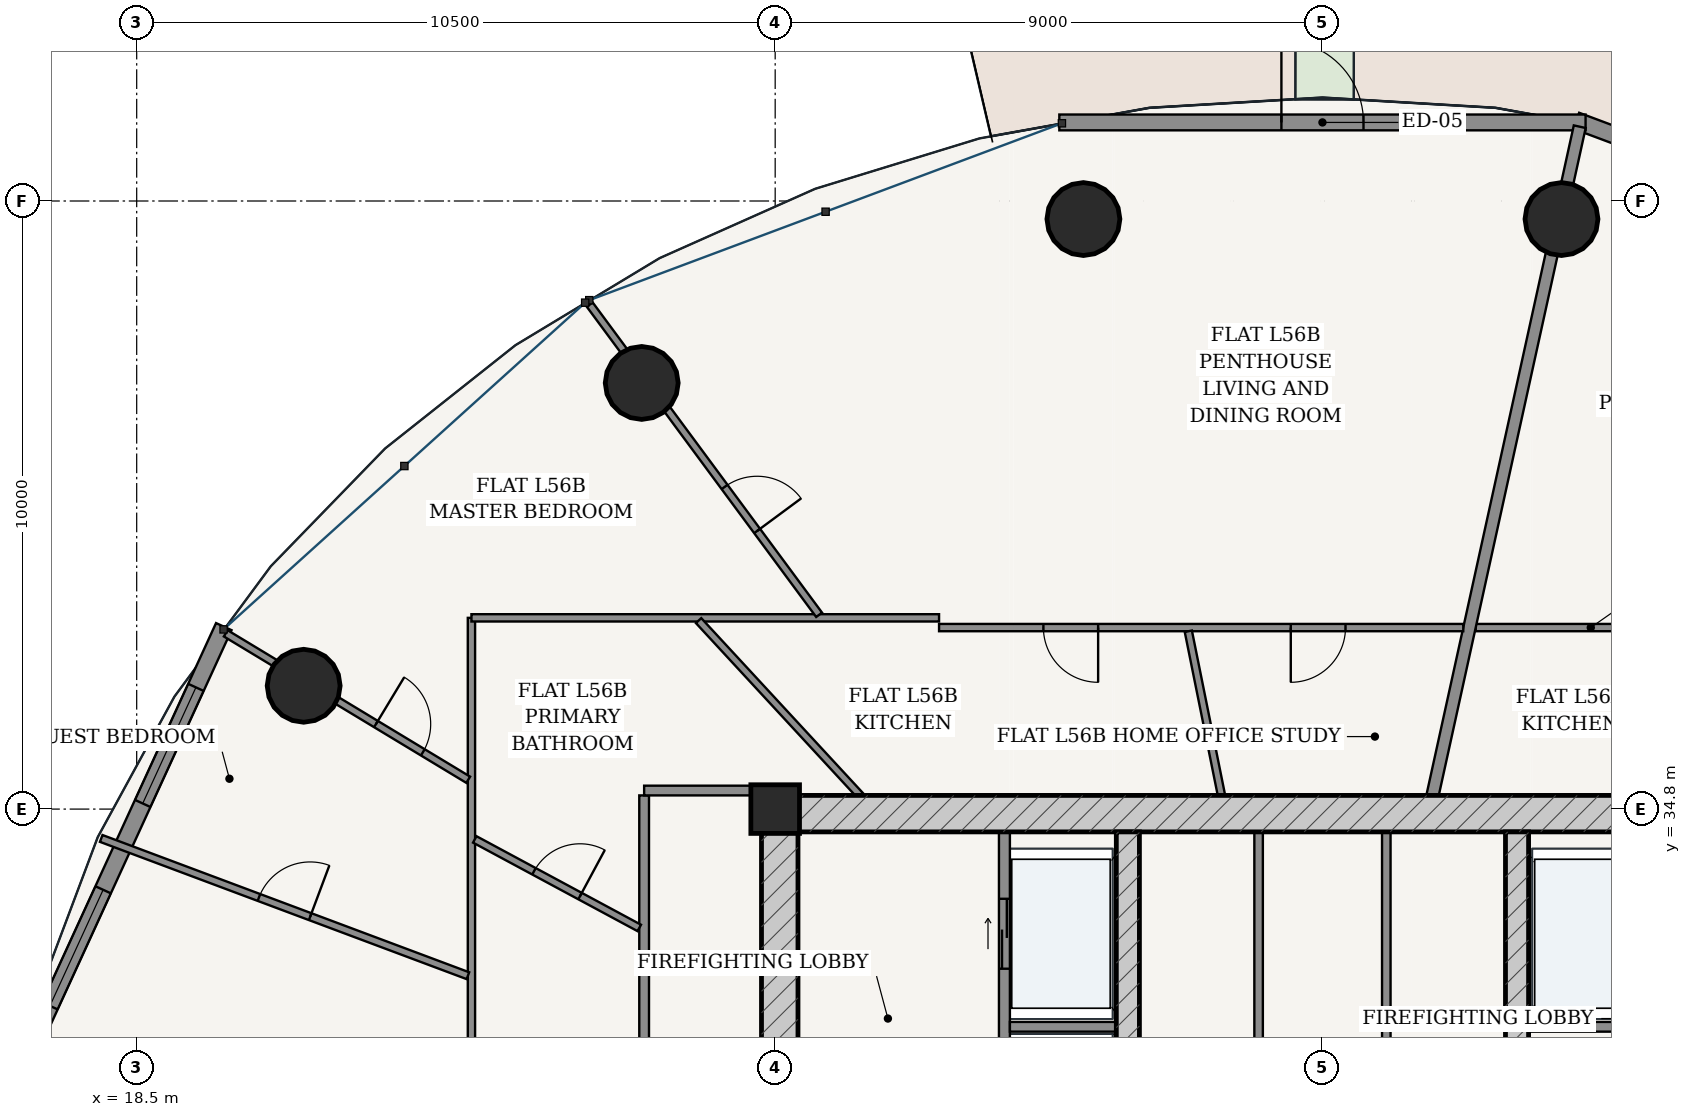
"""IFC4 building model, lengths in metres.
Left out: names, types, materials, properties, quantities, classifications, styles, units other than length and angle.
Written with IfcOpenShell. Run it as: python <this file> out.ifc"""

import sys

from ifc_helpers import new_model, si_unit, direction, frame, frame_2d, origin, origin_2d, place, context, subcontext, project, spatial, rectangle, hollow_circle, extrude, source, transform, mapped, element, fill, save


model = new_model("IFC4")
c1 = context("Model", 3, precision=1e-05, world=origin(), true_north=direction((-0.2419218956, 0.970295726276)))
c2 = subcontext(c1, "Body", "Model", "MODEL_VIEW")
j1 = project(units=[si_unit("LENGTHUNIT", "METRE"), si_unit("PLANEANGLEUNIT", "RADIAN")], contexts=[c1])
p1 = place(None, origin())
s1 = spatial("IfcSite", under=j1, at=p1, CompositionType="ELEMENT")
p2 = place(p1, origin())
s2 = spatial("IfcBuilding", under=s1, at=p2, CompositionType="ELEMENT")
p3 = place(p2, frame((0.0, 0.0, 213.4)))
s3 = spatial("IfcBuildingStorey", under=s2, at=p3, CompositionType="ELEMENT", Elevation=213.4)
p4 = place(p3, frame((29.0, 34.8, 0.0), z_axis=(0.0, 0.0, 1.0), x_axis=(1.0, 0.0, 0.0)))
e1 = element("IfcColumn", 1, at=p4, inside=s3, PredefinedType="COLUMN", context=c2, shape_type="SweptSolid", body=[
    extrude(rectangle(XDim=0.8, YDim=0.8, at=origin_2d()), origin(), (0.0, 0.0, 1.0), 3.7),
])
p5 = place(p3, frame((28.775, 34.725, 0.0), z_axis=(0.0, 0.0, 1.0), x_axis=(1.0, 0.0, 0.0)))
e2 = element("IfcWall", 2, at=p5, inside=s3, PredefinedType="SHEAR", context=c2, shape_type="SweptSolid", body=[
    extrude(rectangle(XDim=18.45, YDim=0.6, at=frame_2d((9.225, 0.0))), origin(), (0.0, 0.0, 1.0), 3.435),
])
p6 = place(p3, frame((29.075, 19.175, 0.0), z_axis=(0.0, 0.0, 1.0), x_axis=(0.0, 1.0, 0.0)))
e3 = element("IfcWall", 3, at=p6, inside=s3, PredefinedType="SHEAR", context=c2, shape_type="SweptSolid", body=[
    extrude(rectangle(XDim=15.25, YDim=0.6, at=frame_2d((7.625, 0.0))), origin(), (0.0, 0.0, 1.0), 3.435),
])
p7 = place(p6, frame((9.875, 0.0, 0.0)))
e4 = element("IfcOpeningElement", 4, at=p7, cuts=e3, PredefinedType="OPENING", context=c2, shape_type="SweptSolid", body=[
    extrude(rectangle(XDim=1.5, YDim=2.2, at=frame_2d((0.75, 1.1))), frame((0.0, 0.31, 0.0), z_axis=(0.0, -1.0, 0.0), x_axis=(1.0, 0.0, 0.0)), (0.0, 0.0, 1.0), 0.62),
])
p8 = place(p3, frame((34.8, 19.175, 0.0), z_axis=(0.0, 0.0, 1.0), x_axis=(0.0, 1.0, 0.0)))
e5 = element("IfcWall", 5, at=p8, inside=s3, PredefinedType="SHEAR", context=c2, shape_type="SweptSolid", body=[
    extrude(rectangle(XDim=15.25, YDim=0.38, at=frame_2d((7.625, 0.0))), origin(), (0.0, 0.0, 1.0), 3.435),
])
p9 = place(p8, frame((7.8, 0.0, 0.0)))
e6 = element("IfcOpeningElement", 6, at=p9, cuts=e5, PredefinedType="OPENING", context=c2, shape_type="SweptSolid", body=[
    extrude(rectangle(XDim=1.05, YDim=2.15, at=frame_2d((0.525, 1.075))), frame((0.0, 0.2, 0.0), z_axis=(0.0, -1.0, 0.0), x_axis=(1.0, 0.0, 0.0)), (0.0, 0.0, 1.0), 0.4),
])
p10 = place(p3, frame((41.2, 19.175, 0.0), z_axis=(0.0, 0.0, 1.0), x_axis=(0.0, 1.0, 0.0)))
e7 = element("IfcWall", 7, at=p10, inside=s3, PredefinedType="SHEAR", context=c2, shape_type="SweptSolid", body=[
    extrude(rectangle(XDim=15.25, YDim=0.38, at=frame_2d((7.625, 0.0))), origin(), (0.0, 0.0, 1.0), 3.435),
])
p11 = place(p10, frame((7.8, 0.0, 0.0)))
e8 = element("IfcOpeningElement", 8, at=p11, cuts=e7, PredefinedType="OPENING", context=c2, shape_type="SweptSolid", body=[
    extrude(rectangle(XDim=1.05, YDim=2.15, at=frame_2d((0.525, 1.075))), frame((0.0, 0.2, 0.0), z_axis=(0.0, -1.0, 0.0), x_axis=(1.0, 0.0, 0.0)), (0.0, 0.0, 1.0), 0.4),
])
for number, where, z_axis, x_axis in (
    (9, (41.931, 44.503, 0.0), (0.0, 0.0, 1.0), (1.0, 0.0, 0.0)),
    (10, (34.069, 44.503, 0.0), (0.0, 0.0, 1.0), (1.0, 0.0, 0.0)),
    (11, (26.805, 41.808, 0.0), (0.0, 0.0, 1.0), (1.0, 0.0, 0.0)),
    (12, (21.246, 36.828, 0.0), (0.0, 0.0, 1.0), (1.0, 0.0, 0.0)),
):
    element("IfcColumn", number, at=place(p3, frame(where, z_axis=z_axis, x_axis=x_axis)), inside=s3, PredefinedType="COLUMN", context=c2, shape_type="SweptSolid", body=[
        extrude(hollow_circle(Radius=0.6, WallThickness=0.038, at=origin_2d()), origin(), (0.0, 0.0, 1.0), 3.7),
    ])
p12 = place(p3, frame((50.17, 43.127, 0.0), z_axis=(0.0, 0.0, 1.0), x_axis=(-0.936556918375, 0.350515532672, 0.0)))
e13 = element("IfcWall", 13, at=p12, inside=s3, PredefinedType="SOLIDWALL", context=c2, shape_type="SweptSolid", body=[
    extrude(rectangle(XDim=8.539, YDim=0.28, at=frame_2d((4.27, 0.0))), origin(), (0.0, 0.0, 1.0), 3.435),
])
p13 = place(p12, frame((1.256, 0.0, 0.85)))
e14 = element("IfcOpeningElement", 14, at=p13, cuts=e13, PredefinedType="OPENING", context=c2, shape_type="SweptSolid", body=[
    extrude(rectangle(XDim=2.1, YDim=1.95, at=frame_2d((1.05, 0.975))), frame((0.0, 0.15, 0.0), z_axis=(0.0, -1.0, 0.0), x_axis=(1.0, 0.0, 0.0)), (0.0, 0.0, 1.0), 0.3),
])
p14 = place(p12, frame((5.184, 0.0, 0.85)))
e15 = element("IfcOpeningElement", 15, at=p14, cuts=e13, PredefinedType="OPENING", context=c2, shape_type="SweptSolid", body=[
    extrude(rectangle(XDim=2.1, YDim=1.95, at=frame_2d((1.05, 0.975))), frame((0.0, 0.15, 0.0), z_axis=(0.0, -1.0, 0.0), x_axis=(1.0, 0.0, 0.0)), (0.0, 0.0, 1.0), 0.3),
])
p15 = place(p3, frame((42.327, 46.092, 0.0), z_axis=(0.0, 0.0, 1.0), x_axis=(-1.0, 0.0, 0.0)))
e16 = element("IfcWall", 16, at=p15, inside=s3, PredefinedType="SOLIDWALL", context=c2, shape_type="SweptSolid", body=[
    extrude(rectangle(XDim=8.654, YDim=0.26, at=frame_2d((4.327, 0.0))), origin(), (0.0, 0.0, 1.0), 3.435),
])
p16 = place(p15, frame((3.652, 0.0, 0.0)))
e17 = element("IfcOpeningElement", 17, at=p16, cuts=e16, PredefinedType="OPENING", context=c2, shape_type="SweptSolid", body=[
    extrude(rectangle(XDim=1.35, YDim=2.2, at=frame_2d((0.675, 1.1))), frame((0.0, 0.14, 0.0), z_axis=(0.0, -1.0, 0.0), x_axis=(1.0, 0.0, 0.0)), (0.0, 0.0, 1.0), 0.28),
])
p17 = place(p3, frame((19.932, 37.801, 0.0), z_axis=(0.0, 0.0, 1.0), x_axis=(-0.416717018135, -0.909036262641, 0.0)))
e18 = element("IfcWall", 18, at=p17, inside=s3, PredefinedType="SOLIDWALL", context=c2, shape_type="SweptSolid", body=[
    extrude(rectangle(XDim=7.96, YDim=0.28, at=frame_2d((3.98, 0.0))), origin(), (0.0, 0.0, 1.0), 3.435),
])
p18 = place(p17, frame((1.099, 0.0, 0.85)))
e19 = element("IfcOpeningElement", 19, at=p18, cuts=e18, PredefinedType="OPENING", context=c2, shape_type="SweptSolid", body=[
    extrude(rectangle(XDim=2.1, YDim=1.95, at=frame_2d((1.05, 0.975))), frame((0.0, 0.15, 0.0), z_axis=(0.0, -1.0, 0.0), x_axis=(1.0, 0.0, 0.0)), (0.0, 0.0, 1.0), 0.3),
])
p19 = place(p17, frame((4.761, 0.0, 0.85)))
e20 = element("IfcOpeningElement", 20, at=p19, cuts=e18, PredefinedType="OPENING", context=c2, shape_type="SweptSolid", body=[
    extrude(rectangle(XDim=2.1, YDim=1.95, at=frame_2d((1.05, 0.975))), frame((0.0, 0.15, 0.0), z_axis=(0.0, -1.0, 0.0), x_axis=(1.0, 0.0, 0.0)), (0.0, 0.0, 1.0), 0.3),
])
p20 = place(p3, frame((32.77, 28.52, 0.0), z_axis=(0.0, 0.0, 1.0), x_axis=(0.0, 1.0, 0.0)))
e21 = element("IfcWall", 21, at=p20, inside=s3, PredefinedType="PARTITIONING", context=c2, shape_type="SweptSolid", body=[
    extrude(rectangle(XDim=5.905, YDim=0.18, at=frame_2d((2.953, 0.0))), origin(), (0.0, 0.0, 1.0), 3.435),
])
p21 = place(p20, frame((3.655, 0.0, 0.0)))
e22 = element("IfcOpeningElement", 22, at=p21, cuts=e21, PredefinedType="OPENING", context=c2, shape_type="SweptSolid", body=[
    extrude(rectangle(XDim=1.15, YDim=2.2, at=frame_2d((0.575, 1.1))), frame((0.0, 0.1, 0.0), z_axis=(0.0, -1.0, 0.0), x_axis=(1.0, 0.0, 0.0)), (0.0, 0.0, 1.0), 0.2),
])
p22 = place(p20, frame((0.73, 0.0, 0.0)))
e23 = element("IfcOpeningElement", 23, at=p22, cuts=e21, PredefinedType="OPENING", context=c2, shape_type="SweptSolid", body=[
    extrude(rectangle(XDim=1.2, YDim=2.25, at=frame_2d((0.6, 1.125))), frame((0.0, 0.1, 0.0), z_axis=(0.0, -1.0, 0.0), x_axis=(1.0, 0.0, 0.0)), (0.0, 0.0, 1.0), 0.2),
])
for number, where, z_axis, x_axis in (
    (24, (32.86, 31.22, 0.0), (0.0, 0.0, 1.0), (1.0, 0.0, 0.0)),
    (25, (41.39, 31.22, 0.0), (0.0, 0.0, 1.0), (1.0, 0.0, 0.0)),
):
    element("IfcWall", number, at=place(p3, frame(where, z_axis=z_axis, x_axis=x_axis)), inside=s3, PredefinedType="PARTITIONING", context=c2, shape_type="SweptSolid", body=[
        extrude(rectangle(XDim=1.75, YDim=0.16, at=frame_2d((0.875, 0.0))), origin(), (0.0, 0.0, 1.0), 3.435),
    ])
for number, where, z_axis, x_axis in (
    (26, (36.95, 28.56, 0.0), (0.0, 0.0, 1.0), (0.0, 1.0, 0.0)),
    (27, (39.05, 28.56, 0.0), (0.0, 0.0, 1.0), (0.0, 1.0, 0.0)),
):
    element("IfcWall", number, at=place(p3, frame(where, z_axis=z_axis, x_axis=x_axis)), inside=s3, PredefinedType="PARTITIONING", context=c2, shape_type="SweptSolid", body=[
        extrude(rectangle(XDim=5.865, YDim=0.14, at=frame_2d((2.933, 0.0))), origin(), (0.0, 0.0, 1.0), 3.435),
    ])
p23 = place(p3, frame((26.845, 24.4, 0.0), z_axis=(0.0, 0.0, 1.0), x_axis=(0.0, 1.0, 0.0)))
e28 = element("IfcWall", 28, at=p23, inside=s3, PredefinedType="PARTITIONING", context=c2, shape_type="SweptSolid", body=[
    extrude(rectangle(XDim=10.625, YDim=0.16, at=frame_2d((5.312, 0.0))), origin(), (0.0, 0.0, 1.0), 2.951),
])
p24 = place(p23, frame((4.936, 0.0, 0.0)))
e29 = element("IfcOpeningElement", 29, at=p24, cuts=e28, PredefinedType="OPENING", context=c2, shape_type="SweptSolid", body=[
    extrude(rectangle(XDim=0.98, YDim=2.2, at=frame_2d((0.49, 1.1))), frame((0.0, 0.09, 0.0), z_axis=(0.0, -1.0, 0.0), x_axis=(1.0, 0.0, 0.0)), (0.0, 0.0, 1.0), 0.18),
])
p25 = place(p3, frame((26.845, 35.105, 0.0), z_axis=(0.0, 0.0, 1.0), x_axis=(1.0, 0.0, 0.0)))
e30 = element("IfcWall", 30, at=p25, inside=s3, PredefinedType="PARTITIONING", context=c2, shape_type="SweptSolid", body=[
    extrude(rectangle(XDim=1.93, YDim=0.16, at=frame_2d((0.965, 0.0))), origin(), (0.0, 0.0, 1.0), 3.435),
])
p26 = place(p3, frame((40.52, 37.785, 0.0), z_axis=(0.0, 0.0, 1.0), x_axis=(1.0, 0.0, 0.0)))
e31 = element("IfcWall", 31, at=p26, inside=s3, PredefinedType="PARTITIONING", context=c2, shape_type="SweptSolid", body=[
    extrude(rectangle(XDim=3.785, YDim=0.12, at=frame_2d((1.893, 0.0))), origin(), (0.0, 0.0, 1.0), 2.951),
])
p27 = place(p3, frame((39.811, 35.027, 0.0), z_axis=(0.0, 0.0, 1.0), x_axis=(0.214966857327, 0.976621344356, 0.0)))
e32 = element("IfcWall", 32, at=p27, inside=s3, PredefinedType="PARTITIONING", context=c2, shape_type="SweptSolid", body=[
    extrude(rectangle(XDim=11.258, YDim=0.2, at=frame_2d((5.629, 0.0))), origin(), (0.0, 0.0, 1.0), 2.52),
])
p28 = place(p3, frame((24.005, 26.902, 0.0), z_axis=(0.0, 0.0, 1.0), x_axis=(0.0, 1.0, 0.0)))
e33 = element("IfcWall", 33, at=p28, inside=s3, PredefinedType="PARTITIONING", context=c2, shape_type="SweptSolid", body=[
    extrude(rectangle(XDim=11.043, YDim=0.12, at=frame_2d((5.521, 0.0))), origin(), (0.0, 0.0, 1.0), 2.951),
])
p29 = place(p28, frame((2.246, 0.0, 0.0)))
e34 = element("IfcOpeningElement", 34, at=p29, cuts=e33, PredefinedType="OPENING", context=c2, shape_type="SweptSolid", body=[
    extrude(rectangle(XDim=0.9, YDim=2.15, at=frame_2d((0.45, 1.075))), frame((0.0, 0.07, 0.0), z_axis=(0.0, -1.0, 0.0), x_axis=(1.0, 0.0, 0.0)), (0.0, 0.0, 1.0), 0.14),
])
p30 = place(p3, frame((24.005, 37.945, 0.0), z_axis=(0.0, 0.0, 1.0), x_axis=(1.0, 0.0, 0.0)))
e35 = element("IfcWall", 35, at=p30, inside=s3, PredefinedType="PARTITIONING", context=c2, shape_type="SweptSolid", body=[
    extrude(rectangle(XDim=7.69, YDim=0.12, at=frame_2d((3.845, 0.0))), origin(), (0.0, 0.0, 1.0), 2.951),
])
p31 = place(p3, frame((31.695, 37.785, 0.0), z_axis=(0.0, 0.0, 1.0), x_axis=(1.0, 0.0, 0.0)))
e36 = element("IfcWall", 36, at=p31, inside=s3, PredefinedType="PARTITIONING", context=c2, shape_type="SweptSolid", body=[
    extrude(rectangle(XDim=8.621, YDim=0.12, at=frame_2d((4.311, 0.0))), origin(), (0.0, 0.0, 1.0), 2.951),
])
p32 = place(p31, frame((1.716, 0.0, 0.0)))
e37 = element("IfcOpeningElement", 37, at=p32, cuts=e36, PredefinedType="OPENING", context=c2, shape_type="SweptSolid", body=[
    extrude(rectangle(XDim=0.9, YDim=2.15, at=frame_2d((0.45, 1.075))), frame((0.0, 0.07, 0.0), z_axis=(0.0, -1.0, 0.0), x_axis=(1.0, 0.0, 0.0)), (0.0, 0.0, 1.0), 0.14),
])
p33 = place(p31, frame((5.784, 0.0, 0.0)))
e38 = element("IfcOpeningElement", 38, at=p33, cuts=e36, PredefinedType="OPENING", context=c2, shape_type="SweptSolid", body=[
    extrude(rectangle(XDim=0.9, YDim=2.15, at=frame_2d((0.45, 1.075))), frame((0.0, 0.07, 0.0), z_axis=(0.0, -1.0, 0.0), x_axis=(1.0, 0.0, 0.0)), (0.0, 0.0, 1.0), 0.14),
])
p34 = place(p3, frame((29.722, 37.995, 0.0), z_axis=(0.0, 0.0, 1.0), x_axis=(-0.594518724985, 0.80408176552, 0.0)))
e39 = element("IfcWall", 39, at=p34, inside=s3, PredefinedType="PARTITIONING", context=c2, shape_type="SweptSolid", body=[
    extrude(rectangle(XDim=6.344, YDim=0.12, at=frame_2d((3.172, 0.0))), origin(), (0.0, 0.0, 1.0), 2.951),
])
p35 = place(p34, frame((1.715, 0.0, 0.0)))
e40 = element("IfcOpeningElement", 40, at=p35, cuts=e39, PredefinedType="OPENING", context=c2, shape_type="SweptSolid", body=[
    extrude(rectangle(XDim=0.9, YDim=2.15, at=frame_2d((0.45, 1.075))), frame((0.0, 0.07, 0.0), z_axis=(0.0, -1.0, 0.0), x_axis=(1.0, 0.0, 0.0)), (0.0, 0.0, 1.0), 0.14),
])
p36 = place(p3, frame((23.952, 35.282, 0.0), z_axis=(0.0, 0.0, 1.0), x_axis=(-0.856051317976, 0.516890840499, 0.0)))
e41 = element("IfcWall", 41, at=p36, inside=s3, PredefinedType="PARTITIONING", context=c2, shape_type="SweptSolid", body=[
    extrude(rectangle(XDim=4.658, YDim=0.12, at=frame_2d((2.329, 0.0))), origin(), (0.0, 0.0, 1.0), 2.951),
])
p37 = place(p36, frame((0.872, 0.0, 0.0)))
e42 = element("IfcOpeningElement", 42, at=p37, cuts=e41, PredefinedType="OPENING", context=c2, shape_type="SweptSolid", body=[
    extrude(rectangle(XDim=0.9, YDim=2.15, at=frame_2d((0.45, 1.075))), frame((0.0, 0.07, 0.0), z_axis=(0.0, -1.0, 0.0), x_axis=(1.0, 0.0, 0.0)), (0.0, 0.0, 1.0), 0.14),
])
p38 = place(p3, frame((23.947, 32.06, 0.0), z_axis=(0.0, 0.0, 1.0), x_axis=(-0.936547148815, 0.350541635255, 0.0)))
e43 = element("IfcWall", 43, at=p38, inside=s3, PredefinedType="PARTITIONING", context=c2, shape_type="SweptSolid", body=[
    extrude(rectangle(XDim=6.439, YDim=0.12, at=frame_2d((3.219, 0.0))), origin(), (0.0, 0.0, 1.0), 2.951),
])
p39 = place(p38, frame((2.769, 0.0, 0.0)))
e44 = element("IfcOpeningElement", 44, at=p39, cuts=e43, PredefinedType="OPENING", context=c2, shape_type="SweptSolid", body=[
    extrude(rectangle(XDim=0.9, YDim=2.15, at=frame_2d((0.45, 1.075))), frame((0.0, 0.07, 0.0), z_axis=(0.0, -1.0, 0.0), x_axis=(1.0, 0.0, 0.0)), (0.0, 0.0, 1.0), 0.14),
])
p40 = place(p3, frame((36.339, 35.027, 0.0), z_axis=(0.0, 0.0, 1.0), x_axis=(-0.197856196381, 0.980231057228, 0.0)))
e45 = element("IfcWall", 45, at=p40, inside=s3, PredefinedType="PARTITIONING", context=c2, shape_type="SweptSolid", body=[
    extrude(rectangle(XDim=2.752, YDim=0.12, at=frame_2d((1.376, 0.0))), origin(), (0.0, 0.0, 1.0), 2.52),
])
p41 = place(p3, frame((30.396, 35.026, 0.0), z_axis=(0.0, 0.0, 1.0), x_axis=(-0.678759446058, 0.734360684124, 0.0)))
e46 = element("IfcWall", 46, at=p41, inside=s3, PredefinedType="PARTITIONING", context=c2, shape_type="SweptSolid", body=[
    extrude(rectangle(XDim=3.912, YDim=0.12, at=frame_2d((1.956, 0.0))), origin(), (0.0, 0.0, 1.0), 2.951),
])
p42 = place(p3, frame((26.765, 32.845, 0.0), z_axis=(0.0, 0.0, 1.0), x_axis=(-0.88059355453, 0.473872336943, 0.0)))
e47 = element("IfcWall", 47, at=p42, inside=s3, PredefinedType="PARTITIONING", context=c2, shape_type="SweptSolid", body=[
    extrude(rectangle(XDim=3.072, YDim=0.12, at=frame_2d((1.536, 0.0))), origin(), (0.0, 0.0, 1.0), 3.11),
])
p43 = place(p42, frame((1.106, 0.0, 0.0)))
e48 = element("IfcOpeningElement", 48, at=p43, cuts=e47, PredefinedType="OPENING", context=c2, shape_type="SweptSolid", body=[
    extrude(rectangle(XDim=0.86, YDim=2.15, at=frame_2d((0.43, 1.075))), frame((0.0, 0.07, 0.0), z_axis=(0.0, -1.0, 0.0), x_axis=(1.0, 0.0, 0.0)), (0.0, 0.0, 1.0), 0.14),
])
m1 = source(origin(), c2, "Body", "SweptSolid", [
    extrude(rectangle(XDim=1.35, YDim=2.2, at=frame_2d((0.675, 1.1))), frame((0.0, 0.025, 0.0), z_axis=(0.0, -1.0, 0.0), x_axis=(1.0, 0.0, 0.0)), (0.0, 0.0, 1.0), 0.05),
])
p44 = place(p16, frame((1.35, 0.0, 0.0), z_axis=(0.0, 0.0, 1.0), x_axis=(-1.0, 0.0, 0.0)))
e49 = element("IfcDoor", 49, at=p44, inside=s3, OperationType="SINGLE_SWING_LEFT", PredefinedType="DOOR", context=c2, shape_type="MappedRepresentation", body=[
    mapped(m1, transform((0.0, 0.0, 0.0), scale=1.0)),
])
fill(e17, e49)
m2 = source(origin(), c2, "Body", "SweptSolid", [
    extrude(rectangle(XDim=2.1, YDim=1.95, at=frame_2d((1.05, 0.975))), frame((0.0, 0.03, 0.0), z_axis=(0.0, -1.0, 0.0), x_axis=(1.0, 0.0, 0.0)), (0.0, 0.0, 1.0), 0.06),
])
p45 = place(p18, origin())
e50 = element("IfcWindow", 50, at=p45, inside=s3, PartitioningType="SINGLE_PANEL", PredefinedType="WINDOW", context=c2, shape_type="MappedRepresentation", body=[
    mapped(m2, transform((0.0, 0.0, 0.0), scale=1.0)),
])
fill(e19, e50)
p46 = place(p19, origin())
e51 = element("IfcWindow", 51, at=p46, inside=s3, PartitioningType="SINGLE_PANEL", PredefinedType="WINDOW", context=c2, shape_type="MappedRepresentation", body=[
    mapped(m2, transform((0.0, 0.0, 0.0), scale=1.0)),
])
fill(e20, e51)
m3 = source(origin(), c2, "Body", "SweptSolid", [
    extrude(rectangle(XDim=1.15, YDim=2.2, at=frame_2d((0.575, 1.1))), frame((0.0, 0.025, 0.0), z_axis=(0.0, -1.0, 0.0), x_axis=(1.0, 0.0, 0.0)), (0.0, 0.0, 1.0), 0.05),
])
p47 = place(p21, origin())
e52 = element("IfcDoor", 52, at=p47, inside=s3, OperationType="DOUBLE_DOOR_SLIDING", PredefinedType="DOOR", context=c2, shape_type="MappedRepresentation", body=[
    mapped(m3, transform((0.0, 0.0, 0.0), scale=1.0)),
])
fill(e22, e52)
m4 = source(origin(), c2, "Body", "SweptSolid", [
    extrude(rectangle(XDim=0.86, YDim=2.15, at=frame_2d((0.43, 1.075))), frame((0.0, 0.025, 0.0), z_axis=(0.0, -1.0, 0.0), x_axis=(1.0, 0.0, 0.0)), (0.0, 0.0, 1.0), 0.05),
])
p48 = place(p43, frame((0.86, 0.0, 0.0), z_axis=(0.0, 0.0, 1.0), x_axis=(-1.0, 0.0, 0.0)))
e53 = element("IfcDoor", 53, at=p48, inside=s3, OperationType="SINGLE_SWING_RIGHT", PredefinedType="DOOR", context=c2, shape_type="MappedRepresentation", body=[
    mapped(m4, transform((0.0, 0.0, 0.0), scale=1.0)),
])
fill(e48, e53)
m5 = source(origin(), c2, "Body", "SweptSolid", [
    extrude(rectangle(XDim=0.9, YDim=2.15, at=frame_2d((0.45, 1.075))), frame((0.0, 0.025, 0.0), z_axis=(0.0, -1.0, 0.0), x_axis=(1.0, 0.0, 0.0)), (0.0, 0.0, 1.0), 0.05),
])
p49 = place(p39, frame((0.9, 0.0, 0.0), z_axis=(0.0, 0.0, 1.0), x_axis=(-1.0, 0.0, 0.0)))
e54 = element("IfcDoor", 54, at=p49, inside=s3, OperationType="SINGLE_SWING_RIGHT", PredefinedType="DOOR", context=c2, shape_type="MappedRepresentation", body=[
    mapped(m5, transform((0.0, 0.0, 0.0), scale=1.0)),
])
fill(e44, e54)
p50 = place(p37, frame((0.9, 0.0, 0.0), z_axis=(0.0, 0.0, 1.0), x_axis=(-1.0, 0.0, 0.0)))
e55 = element("IfcDoor", 55, at=p50, inside=s3, OperationType="SINGLE_SWING_LEFT", PredefinedType="DOOR", context=c2, shape_type="MappedRepresentation", body=[
    mapped(m5, transform((0.0, 0.0, 0.0), scale=1.0)),
])
fill(e42, e55)
p51 = place(p35, frame((0.9, 0.0, 0.0), z_axis=(0.0, 0.0, 1.0), x_axis=(-1.0, 0.0, 0.0)))
e56 = element("IfcDoor", 56, at=p51, inside=s3, OperationType="SINGLE_SWING_RIGHT", PredefinedType="DOOR", context=c2, shape_type="MappedRepresentation", body=[
    mapped(m5, transform((0.0, 0.0, 0.0), scale=1.0)),
])
fill(e40, e56)
p52 = place(p32, frame((0.9, 0.0, 0.0), z_axis=(0.0, 0.0, 1.0), x_axis=(-1.0, 0.0, 0.0)))
e57 = element("IfcDoor", 57, at=p52, inside=s3, OperationType="SINGLE_SWING_LEFT", PredefinedType="DOOR", context=c2, shape_type="MappedRepresentation", body=[
    mapped(m5, transform((0.0, 0.0, 0.0), scale=1.0)),
])
fill(e37, e57)
p53 = place(p33, frame((0.9, 0.0, 0.0), z_axis=(0.0, 0.0, 1.0), x_axis=(-1.0, 0.0, 0.0)))
e58 = element("IfcDoor", 58, at=p53, inside=s3, OperationType="SINGLE_SWING_RIGHT", PredefinedType="DOOR", context=c2, shape_type="MappedRepresentation", body=[
    mapped(m5, transform((0.0, 0.0, 0.0), scale=1.0)),
])
fill(e38, e58)
save(model, sys.argv[1])
